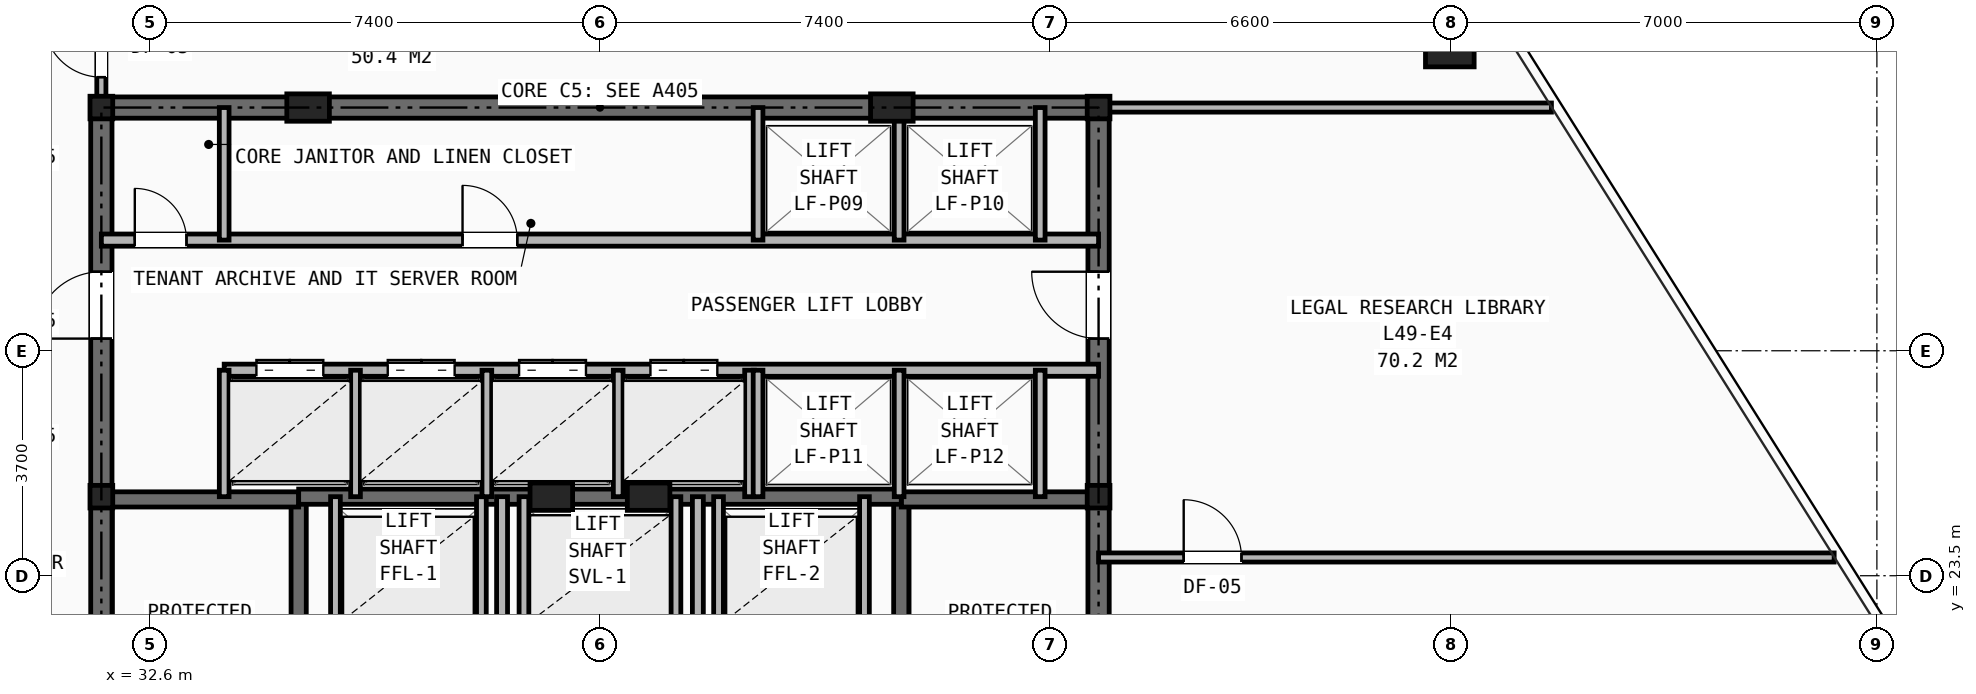
"""IFC4 building model, lengths in metres.
Left out: names, types, materials, properties, quantities, classifications, styles, units other than length and angle.
Written with IfcOpenShell. Run it as: python <this file> out.ifc"""

import sys

from ifc_helpers import new_model, si_unit, direction, frame, frame_2d, origin, origin_2d, place, context, subcontext, project, spatial, rectangle, hollow_rectangle, i_section, extrude, element, fill, save


model = new_model("IFC4")
c1 = context("Model", 3, precision=1e-05, world=origin(), true_north=direction((0.0, 1.0)))
c2 = subcontext(c1, "Body", "Model", "MODEL_VIEW")
j1 = project(units=[si_unit("LENGTHUNIT", "METRE"), si_unit("PLANEANGLEUNIT", "RADIAN")], contexts=[c1])
p1 = place(None, origin())
s1 = spatial("IfcSite", under=j1, at=p1, CompositionType="ELEMENT")
p2 = place(p1, origin())
s2 = spatial("IfcBuilding", under=s1, at=p2, CompositionType="ELEMENT")
p3 = place(p2, frame((0.0, 0.0, 172.35)))
s3 = spatial("IfcBuildingStorey", under=s2, at=p3, CompositionType="ELEMENT", Elevation=172.35)
for number, where, z_axis, x_axis in (
    (1, (31.8, 24.8, 0.0), (0.0, 0.0, 1.0), (1.0, 0.0, 0.0)),
    (2, (48.2, 24.8, 0.0), (0.0, 0.0, 1.0), (1.0, 0.0, 0.0)),
    (3, (31.8, 31.2, 0.0), (0.0, 0.0, 1.0), (1.0, 0.0, 0.0)),
    (4, (48.2, 31.2, 0.0), (0.0, 0.0, 1.0), (1.0, 0.0, 0.0)),
):
    element("IfcColumn", number, at=place(p3, frame(where, z_axis=z_axis, x_axis=x_axis)), inside=s3, PredefinedType="COLUMN", context=c2, shape_type="SweptSolid", body=[
        extrude(i_section(OverallWidth=0.374, OverallDepth=0.372, WebThickness=0.016, FlangeThickness=0.026, at=origin_2d()), origin(), (0.0, 0.0, 1.0), 3.45),
    ])
for number, where, z_axis, x_axis in (
    (5, (35.2, 31.2, 0.0), (0.0, 0.0, 1.0), (1.0, 0.0, 0.0)),
    (6, (44.8, 31.2, 0.0), (0.0, 0.0, 1.0), (1.0, 0.0, 0.0)),
    (7, (39.2, 24.8, 0.0), (0.0, 0.0, 1.0), (1.0, 0.0, 0.0)),
    (8, (40.8, 24.8, 0.0), (0.0, 0.0, 1.0), (1.0, 0.0, 0.0)),
):
    element("IfcColumn", number, at=place(p3, frame(where, z_axis=z_axis, x_axis=x_axis)), inside=s3, PredefinedType="PILASTER", context=c2, shape_type="SweptSolid", body=[
        extrude(rectangle(XDim=0.7, YDim=0.45, at=origin_2d()), origin(), (0.0, 0.0, 1.0), 3.45),
    ])
p4 = place(p3, frame((53.976, 32.269, 0.0), z_axis=(0.0, 0.0, 1.0), x_axis=(1.0, 0.0, 0.0)))
e9 = element("IfcColumn", 9, at=p4, inside=s3, PredefinedType="COLUMN", context=c2, shape_type="SweptSolid", body=[
    extrude(hollow_rectangle(XDim=0.8, YDim=0.8, WallThickness=0.055, at=origin_2d()), origin(), (0.0, 0.0, 1.0), 3.45),
])
p5 = place(p3, frame((31.8, 31.2, 0.0), z_axis=(0.0, 0.0, 1.0), x_axis=(1.0, 0.0, 0.0)))
e10 = element("IfcWall", 10, at=p5, inside=s3, PredefinedType="SHEAR", context=c2, shape_type="SweptSolid", body=[
    extrude(rectangle(XDim=16.4, YDim=0.35, at=frame_2d((8.2, 0.0))), origin(), (0.0, 0.0, 1.0), 3.21),
])
p6 = place(p3, frame((31.8, 16.4, 0.0), z_axis=(0.0, 0.0, 1.0), x_axis=(0.0, 1.0, 0.0)))
e11 = element("IfcWall", 11, at=p6, inside=s3, PredefinedType="SHEAR", context=c2, shape_type="SweptSolid", body=[
    extrude(rectangle(XDim=14.8, YDim=0.35, at=frame_2d((7.4, 0.0))), origin(), (0.0, 0.0, 1.0), 3.21),
])
p7 = place(p6, frame((11.0, 0.0, 0.0)))
e12 = element("IfcOpeningElement", 12, at=p7, cuts=e11, PredefinedType="OPENING", context=c2, shape_type="SweptSolid", body=[
    extrude(rectangle(XDim=1.1, YDim=2.15, at=frame_2d((0.55, 1.075))), frame((0.0, 0.185, 0.0), z_axis=(0.0, -1.0, 0.0), x_axis=(1.0, 0.0, 0.0)), (0.0, 0.0, 1.0), 0.37),
])
p8 = place(p3, frame((48.2, 16.4, 0.0), z_axis=(0.0, 0.0, 1.0), x_axis=(0.0, 1.0, 0.0)))
e13 = element("IfcWall", 13, at=p8, inside=s3, PredefinedType="SHEAR", context=c2, shape_type="SweptSolid", body=[
    extrude(rectangle(XDim=14.8, YDim=0.35, at=frame_2d((7.4, 0.0))), origin(), (0.0, 0.0, 1.0), 3.21),
])
p9 = place(p8, frame((11.0, 0.0, 0.0)))
e14 = element("IfcOpeningElement", 14, at=p9, cuts=e13, PredefinedType="OPENING", context=c2, shape_type="SweptSolid", body=[
    extrude(rectangle(XDim=1.1, YDim=2.15, at=frame_2d((0.55, 1.075))), frame((0.0, 0.185, 0.0), z_axis=(0.0, -1.0, 0.0), x_axis=(1.0, 0.0, 0.0)), (0.0, 0.0, 1.0), 0.37),
])
p10 = place(p3, frame((35.045, 16.4, 0.0), z_axis=(0.0, 0.0, 1.0), x_axis=(0.0, 1.0, 0.0)))
e15 = element("IfcWall", 15, at=p10, inside=s3, PredefinedType="SHEAR", context=c2, shape_type="SweptSolid", body=[
    extrude(rectangle(XDim=8.4, YDim=0.25, at=frame_2d((4.2, 0.0))), origin(), (0.0, 0.0, 1.0), 3.21),
])
p11 = place(p10, frame((0.45, 0.0, 0.0)))
e16 = element("IfcOpeningElement", 16, at=p11, cuts=e15, PredefinedType="OPENING", context=c2, shape_type="SweptSolid", body=[
    extrude(rectangle(XDim=0.95, YDim=2.1, at=frame_2d((0.475, 1.05))), frame((0.0, 0.135, 0.0), z_axis=(0.0, -1.0, 0.0), x_axis=(1.0, 0.0, 0.0)), (0.0, 0.0, 1.0), 0.27),
])
p12 = place(p3, frame((31.8, 24.755, 0.0), z_axis=(0.0, 0.0, 1.0), x_axis=(1.0, 0.0, 0.0)))
e17 = element("IfcWall", 17, at=p12, inside=s3, PredefinedType="SHEAR", context=c2, shape_type="SweptSolid", body=[
    extrude(rectangle(XDim=3.245, YDim=0.25, at=frame_2d((1.623, 0.0))), origin(), (0.0, 0.0, 1.0), 3.21),
])
p13 = place(p3, frame((44.955, 16.4, 0.0), z_axis=(0.0, 0.0, 1.0), x_axis=(0.0, 1.0, 0.0)))
e18 = element("IfcWall", 18, at=p13, inside=s3, PredefinedType="SHEAR", context=c2, shape_type="SweptSolid", body=[
    extrude(rectangle(XDim=8.4, YDim=0.25, at=frame_2d((4.2, 0.0))), origin(), (0.0, 0.0, 1.0), 3.21),
])
p14 = place(p13, frame((0.45, 0.0, 0.0)))
e19 = element("IfcOpeningElement", 19, at=p14, cuts=e18, PredefinedType="OPENING", context=c2, shape_type="SweptSolid", body=[
    extrude(rectangle(XDim=0.95, YDim=2.1, at=frame_2d((0.475, 1.05))), frame((0.0, 0.135, 0.0), z_axis=(0.0, -1.0, 0.0), x_axis=(1.0, 0.0, 0.0)), (0.0, 0.0, 1.0), 0.27),
])
p15 = place(p3, frame((44.955, 24.755, 0.0), z_axis=(0.0, 0.0, 1.0), x_axis=(1.0, 0.0, 0.0)))
e20 = element("IfcWall", 20, at=p15, inside=s3, PredefinedType="SHEAR", context=c2, shape_type="SweptSolid", body=[
    extrude(rectangle(XDim=3.245, YDim=0.25, at=frame_2d((1.623, 0.0))), origin(), (0.0, 0.0, 1.0), 3.21),
])
p16 = place(p3, frame((35.045, 24.8, 0.0), z_axis=(0.0, 0.0, 1.0), x_axis=(1.0, 0.0, 0.0)))
e21 = element("IfcWall", 21, at=p16, inside=s3, PredefinedType="SHEAR", context=c2, shape_type="SweptSolid", body=[
    extrude(rectangle(XDim=9.91, YDim=0.25, at=frame_2d((4.955, 0.0))), origin(), (0.0, 0.0, 1.0), 3.21),
])
p17 = place(p3, frame((38.39, 16.4, 0.0), z_axis=(0.0, 0.0, 1.0), x_axis=(0.0, 1.0, 0.0)))
e22 = element("IfcWall", 22, at=p17, inside=s3, PredefinedType="PARTITIONING", context=c2, shape_type="SweptSolid", body=[
    extrude(rectangle(XDim=8.4, YDim=0.18, at=frame_2d((4.2, 0.0))), origin(), (0.0, 0.0, 1.0), 2.665),
])
p18 = place(p17, frame((3.8, 0.0, 0.0)))
e23 = element("IfcOpeningElement", 23, at=p18, cuts=e22, PredefinedType="OPENING", context=c2, shape_type="SweptSolid", body=[
    extrude(rectangle(XDim=0.95, YDim=2.1, at=frame_2d((0.475, 1.05))), frame((0.0, 0.1, 0.0), z_axis=(0.0, -1.0, 0.0), x_axis=(1.0, 0.0, 0.0)), (0.0, 0.0, 1.0), 0.2),
])
p19 = place(p3, frame((41.61, 16.4, 0.0), z_axis=(0.0, 0.0, 1.0), x_axis=(0.0, 1.0, 0.0)))
e24 = element("IfcWall", 24, at=p19, inside=s3, PredefinedType="PARTITIONING", context=c2, shape_type="SweptSolid", body=[
    extrude(rectangle(XDim=8.4, YDim=0.18, at=frame_2d((4.2, 0.0))), origin(), (0.0, 0.0, 1.0), 2.665),
])
for number, where, z_axis, x_axis in (
    (25, (35.65, 22.48, 0.0), (0.0, 0.0, 1.0), (0.0, 1.0, 0.0)),
    (26, (38.05, 22.48, 0.0), (0.0, 0.0, 1.0), (0.0, 1.0, 0.0)),
    (27, (41.95, 22.48, 0.0), (0.0, 0.0, 1.0), (0.0, 1.0, 0.0)),
    (28, (44.35, 22.48, 0.0), (0.0, 0.0, 1.0), (0.0, 1.0, 0.0)),
    (29, (38.75, 22.48, 0.0), (0.0, 0.0, 1.0), (0.0, 1.0, 0.0)),
    (30, (41.25, 22.48, 0.0), (0.0, 0.0, 1.0), (0.0, 1.0, 0.0)),
):
    element("IfcWall", number, at=place(p3, frame(where, z_axis=z_axis, x_axis=x_axis)), inside=s3, PredefinedType="SOLIDWALL", context=c2, shape_type="SweptSolid", body=[
        extrude(rectangle(XDim=2.32, YDim=0.16, at=frame_2d((1.16, 0.0))), origin(), (0.0, 0.0, 1.0), 3.21),
    ])
p20 = place(p3, frame((31.8, 29.02, 0.0), z_axis=(0.0, 0.0, 1.0), x_axis=(1.0, 0.0, 0.0)))
e31 = element("IfcWall", 31, at=p20, inside=s3, PredefinedType="SOLIDWALL", context=c2, shape_type="SweptSolid", body=[
    extrude(rectangle(XDim=16.4, YDim=0.2, at=frame_2d((8.2, 0.0))), origin(), (0.0, 0.0, 1.0), 2.665),
])
p21 = place(p20, frame((0.55, 0.0, 0.0)))
e32 = element("IfcOpeningElement", 32, at=p21, cuts=e31, PredefinedType="OPENING", context=c2, shape_type="SweptSolid", body=[
    extrude(rectangle(XDim=0.85, YDim=2.05, at=frame_2d((0.425, 1.025))), frame((0.0, 0.11, 0.0), z_axis=(0.0, -1.0, 0.0), x_axis=(1.0, 0.0, 0.0)), (0.0, 0.0, 1.0), 0.22),
])
p22 = place(p20, frame((5.94, 0.0, 0.0)))
e33 = element("IfcOpeningElement", 33, at=p22, cuts=e31, PredefinedType="OPENING", context=c2, shape_type="SweptSolid", body=[
    extrude(rectangle(XDim=0.9, YDim=2.1, at=frame_2d((0.45, 1.05))), frame((0.0, 0.11, 0.0), z_axis=(0.0, -1.0, 0.0), x_axis=(1.0, 0.0, 0.0)), (0.0, 0.0, 1.0), 0.22),
])
p23 = place(p3, frame((33.82, 26.88, 0.0), z_axis=(0.0, 0.0, 1.0), x_axis=(1.0, 0.0, 0.0)))
e34 = element("IfcWall", 34, at=p23, inside=s3, PredefinedType="SOLIDWALL", context=c2, shape_type="SweptSolid", body=[
    extrude(rectangle(XDim=14.38, YDim=0.2, at=frame_2d((7.19, 0.0))), origin(), (0.0, 0.0, 1.0), 2.665),
])
p24 = place(p23, frame((0.53, 0.0, 0.0)))
e35 = element("IfcOpeningElement", 35, at=p24, cuts=e34, PredefinedType="OPENING", context=c2, shape_type="SweptSolid", body=[
    extrude(rectangle(XDim=1.1, YDim=2.15, at=frame_2d((0.55, 1.075))), frame((0.0, 0.11, 0.0), z_axis=(0.0, -1.0, 0.0), x_axis=(1.0, 0.0, 0.0)), (0.0, 0.0, 1.0), 0.22),
])
p25 = place(p23, frame((2.69, 0.0, 0.0)))
e36 = element("IfcOpeningElement", 36, at=p25, cuts=e34, PredefinedType="OPENING", context=c2, shape_type="SweptSolid", body=[
    extrude(rectangle(XDim=1.1, YDim=2.15, at=frame_2d((0.55, 1.075))), frame((0.0, 0.11, 0.0), z_axis=(0.0, -1.0, 0.0), x_axis=(1.0, 0.0, 0.0)), (0.0, 0.0, 1.0), 0.22),
])
p26 = place(p23, frame((4.85, 0.0, 0.0)))
e37 = element("IfcOpeningElement", 37, at=p26, cuts=e34, PredefinedType="OPENING", context=c2, shape_type="SweptSolid", body=[
    extrude(rectangle(XDim=1.1, YDim=2.15, at=frame_2d((0.55, 1.075))), frame((0.0, 0.11, 0.0), z_axis=(0.0, -1.0, 0.0), x_axis=(1.0, 0.0, 0.0)), (0.0, 0.0, 1.0), 0.22),
])
p27 = place(p23, frame((7.01, 0.0, 0.0)))
e38 = element("IfcOpeningElement", 38, at=p27, cuts=e34, PredefinedType="OPENING", context=c2, shape_type="SweptSolid", body=[
    extrude(rectangle(XDim=1.1, YDim=2.15, at=frame_2d((0.55, 1.075))), frame((0.0, 0.11, 0.0), z_axis=(0.0, -1.0, 0.0), x_axis=(1.0, 0.0, 0.0)), (0.0, 0.0, 1.0), 0.22),
])
p28 = place(p3, frame((33.82, 29.02, 0.0), z_axis=(0.0, 0.0, 1.0), x_axis=(0.0, 1.0, 0.0)))
e39 = element("IfcWall", 39, at=p28, inside=s3, PredefinedType="SOLIDWALL", context=c2, shape_type="SweptSolid", body=[
    extrude(rectangle(XDim=2.18, YDim=0.16, at=frame_2d((1.09, 0.0))), origin(), (0.0, 0.0, 1.0), 2.665),
])
for number, where, z_axis, x_axis in (
    (40, (33.82, 24.8, 0.0), (0.0, 0.0, 1.0), (0.0, 1.0, 0.0)),
    (41, (35.98, 24.8, 0.0), (0.0, 0.0, 1.0), (0.0, 1.0, 0.0)),
    (42, (38.14, 24.8, 0.0), (0.0, 0.0, 1.0), (0.0, 1.0, 0.0)),
    (43, (40.3, 24.8, 0.0), (0.0, 0.0, 1.0), (0.0, 1.0, 0.0)),
    (44, (42.46, 24.8, 0.0), (0.0, 0.0, 1.0), (0.0, 1.0, 0.0)),
):
    element("IfcWall", number, at=place(p3, frame(where, z_axis=z_axis, x_axis=x_axis)), inside=s3, PredefinedType="SOLIDWALL", context=c2, shape_type="SweptSolid", body=[
        extrude(rectangle(XDim=2.08, YDim=0.16, at=frame_2d((1.04, 0.0))), origin(), (0.0, 0.0, 1.0), 3.21),
    ])
for number, where, z_axis, x_axis in (
    (45, (42.6, 29.02, 0.0), (0.0, 0.0, 1.0), (0.0, 1.0, 0.0)),
    (46, (44.92, 29.02, 0.0), (0.0, 0.0, 1.0), (0.0, 1.0, 0.0)),
    (47, (47.24, 29.02, 0.0), (0.0, 0.0, 1.0), (0.0, 1.0, 0.0)),
):
    element("IfcWall", number, at=place(p3, frame(where, z_axis=z_axis, x_axis=x_axis)), inside=s3, PredefinedType="SOLIDWALL", context=c2, shape_type="SweptSolid", body=[
        extrude(rectangle(XDim=2.18, YDim=0.16, at=frame_2d((1.09, 0.0))), origin(), (0.0, 0.0, 1.0), 2.665),
    ])
for number, where, z_axis, x_axis in (
    (48, (42.6, 24.8, 0.0), (0.0, 0.0, 1.0), (0.0, 1.0, 0.0)),
    (49, (44.92, 24.8, 0.0), (0.0, 0.0, 1.0), (0.0, 1.0, 0.0)),
    (50, (47.24, 24.8, 0.0), (0.0, 0.0, 1.0), (0.0, 1.0, 0.0)),
):
    element("IfcWall", number, at=place(p3, frame(where, z_axis=z_axis, x_axis=x_axis)), inside=s3, PredefinedType="SOLIDWALL", context=c2, shape_type="SweptSolid", body=[
        extrude(rectangle(XDim=2.08, YDim=0.16, at=frame_2d((1.04, 0.0))), origin(), (0.0, 0.0, 1.0), 3.21),
    ])
p29 = place(p3, frame((31.8, 31.2, 0.0), z_axis=(0.0, 0.0, 1.0), x_axis=(0.0, 1.0, 0.0)))
e51 = element("IfcWall", 51, at=p29, inside=s3, PredefinedType="PARTITIONING", context=c2, shape_type="SweptSolid", body=[
    extrude(rectangle(XDim=5.3, YDim=0.15, at=frame_2d((2.65, 0.0))), origin(), (0.0, 0.0, 1.0), 2.252),
])
p30 = place(p29, frame((0.5, 0.0, 0.0)))
e52 = element("IfcOpeningElement", 52, at=p30, cuts=e51, PredefinedType="OPENING", context=c2, shape_type="SweptSolid", body=[
    extrude(rectangle(XDim=0.95, YDim=2.1, at=frame_2d((0.475, 1.05))), frame((0.0, 0.085, 0.0), z_axis=(0.0, -1.0, 0.0), x_axis=(1.0, 0.0, 0.0)), (0.0, 0.0, 1.0), 0.17),
])
p31 = place(p29, frame((2.9, 0.0, 0.0)))
e53 = element("IfcOpeningElement", 53, at=p31, cuts=e51, PredefinedType="OPENING", context=c2, shape_type="SweptSolid", body=[
    extrude(rectangle(XDim=0.95, YDim=2.1, at=frame_2d((0.475, 1.05))), frame((0.0, 0.085, 0.0), z_axis=(0.0, -1.0, 0.0), x_axis=(1.0, 0.0, 0.0)), (0.0, 0.0, 1.0), 0.17),
])
p32 = place(p3, frame((48.2, 31.2, 0.0), z_axis=(0.0, 0.0, 1.0), x_axis=(1.0, 0.0, 0.0)))
e54 = element("IfcWall", 54, at=p32, inside=s3, PredefinedType="PARTITIONING", context=c2, shape_type="SweptSolid", body=[
    extrude(rectangle(XDim=7.448, YDim=0.15, at=frame_2d((3.724, 0.0))), origin(), (0.0, 0.0, 1.0), 2.252),
])
p33 = place(p3, frame((48.2, 23.8, 0.0), z_axis=(0.0, 0.0, 1.0), x_axis=(1.0, 0.0, 0.0)))
e55 = element("IfcWall", 55, at=p33, inside=s3, PredefinedType="PARTITIONING", context=c2, shape_type="SweptSolid", body=[
    extrude(rectangle(XDim=12.097, YDim=0.15, at=frame_2d((6.049, 0.0))), origin(), (0.0, 0.0, 1.0), 2.589),
])
p34 = place(p33, frame((1.4, 0.0, 0.0)))
e56 = element("IfcOpeningElement", 56, at=p34, cuts=e55, PredefinedType="OPENING", context=c2, shape_type="SweptSolid", body=[
    extrude(rectangle(XDim=0.95, YDim=2.1, at=frame_2d((0.475, 1.05))), frame((0.0, 0.085, 0.0), z_axis=(0.0, -1.0, 0.0), x_axis=(1.0, 0.0, 0.0)), (0.0, 0.0, 1.0), 0.17),
])
p35 = place(p21, origin())
e57 = element("IfcDoor", 57, at=p35, inside=s3, OperationType="SINGLE_SWING_LEFT", PredefinedType="DOOR", context=c2, shape_type="SweptSolid", body=[
    extrude(rectangle(XDim=0.85, YDim=2.05, at=frame_2d((0.425, 1.025))), frame((0.0, 0.025, 0.0), z_axis=(0.0, -1.0, 0.0), x_axis=(1.0, 0.0, 0.0)), (0.0, 0.0, 1.0), 0.05),
])
fill(e32, e57)
p36 = place(p7, origin())
e58 = element("IfcDoor", 58, at=p36, inside=s3, OperationType="SINGLE_SWING_LEFT", PredefinedType="DOOR", context=c2, shape_type="SweptSolid", body=[
    extrude(rectangle(XDim=1.1, YDim=2.15, at=frame_2d((0.55, 1.075))), frame((0.0, 0.025, 0.0), z_axis=(0.0, -1.0, 0.0), x_axis=(1.0, 0.0, 0.0)), (0.0, 0.0, 1.0), 0.05),
])
fill(e12, e58)
p37 = place(p9, origin())
e59 = element("IfcDoor", 59, at=p37, inside=s3, OperationType="SINGLE_SWING_RIGHT", PredefinedType="DOOR", context=c2, shape_type="SweptSolid", body=[
    extrude(rectangle(XDim=1.1, YDim=2.15, at=frame_2d((0.55, 1.075))), frame((0.0, 0.025, 0.0), z_axis=(0.0, -1.0, 0.0), x_axis=(1.0, 0.0, 0.0)), (0.0, 0.0, 1.0), 0.05),
])
fill(e14, e59)
p38 = place(p22, origin())
e60 = element("IfcDoor", 60, at=p38, inside=s3, OperationType="SINGLE_SWING_LEFT", PredefinedType="DOOR", context=c2, shape_type="SweptSolid", body=[
    extrude(rectangle(XDim=0.9, YDim=2.1, at=frame_2d((0.45, 1.05))), frame((0.0, 0.025, 0.0), z_axis=(0.0, -1.0, 0.0), x_axis=(1.0, 0.0, 0.0)), (0.0, 0.0, 1.0), 0.05),
])
fill(e33, e60)
p39 = place(p24, origin())
e61 = element("IfcDoor", 61, at=p39, inside=s3, OperationType="DOUBLE_DOOR_SLIDING", PredefinedType="DOOR", context=c2, shape_type="SweptSolid", body=[
    extrude(rectangle(XDim=1.1, YDim=2.15, at=frame_2d((0.55, 1.075))), frame((0.0, 0.025, 0.0), z_axis=(0.0, -1.0, 0.0), x_axis=(1.0, 0.0, 0.0)), (0.0, 0.0, 1.0), 0.05),
])
fill(e35, e61)
p40 = place(p25, origin())
e62 = element("IfcDoor", 62, at=p40, inside=s3, OperationType="DOUBLE_DOOR_SLIDING", PredefinedType="DOOR", context=c2, shape_type="SweptSolid", body=[
    extrude(rectangle(XDim=1.1, YDim=2.15, at=frame_2d((0.55, 1.075))), frame((0.0, 0.025, 0.0), z_axis=(0.0, -1.0, 0.0), x_axis=(1.0, 0.0, 0.0)), (0.0, 0.0, 1.0), 0.05),
])
fill(e36, e62)
p41 = place(p26, origin())
e63 = element("IfcDoor", 63, at=p41, inside=s3, OperationType="DOUBLE_DOOR_SLIDING", PredefinedType="DOOR", context=c2, shape_type="SweptSolid", body=[
    extrude(rectangle(XDim=1.1, YDim=2.15, at=frame_2d((0.55, 1.075))), frame((0.0, 0.025, 0.0), z_axis=(0.0, -1.0, 0.0), x_axis=(1.0, 0.0, 0.0)), (0.0, 0.0, 1.0), 0.05),
])
fill(e37, e63)
p42 = place(p27, origin())
e64 = element("IfcDoor", 64, at=p42, inside=s3, OperationType="DOUBLE_DOOR_SLIDING", PredefinedType="DOOR", context=c2, shape_type="SweptSolid", body=[
    extrude(rectangle(XDim=1.1, YDim=2.15, at=frame_2d((0.55, 1.075))), frame((0.0, 0.025, 0.0), z_axis=(0.0, -1.0, 0.0), x_axis=(1.0, 0.0, 0.0)), (0.0, 0.0, 1.0), 0.05),
])
fill(e38, e64)
p43 = place(p30, origin())
e65 = element("IfcDoor", 65, at=p43, inside=s3, OperationType="SINGLE_SWING_RIGHT", PredefinedType="DOOR", context=c2, shape_type="SweptSolid", body=[
    extrude(rectangle(XDim=0.95, YDim=2.1, at=frame_2d((0.475, 1.05))), frame((0.0, 0.025, 0.0), z_axis=(0.0, -1.0, 0.0), x_axis=(1.0, 0.0, 0.0)), (0.0, 0.0, 1.0), 0.05),
])
fill(e52, e65)
p44 = place(p34, origin())
e66 = element("IfcDoor", 66, at=p44, inside=s3, OperationType="SINGLE_SWING_LEFT", PredefinedType="DOOR", context=c2, shape_type="SweptSolid", body=[
    extrude(rectangle(XDim=0.95, YDim=2.1, at=frame_2d((0.475, 1.05))), frame((0.0, 0.025, 0.0), z_axis=(0.0, -1.0, 0.0), x_axis=(1.0, 0.0, 0.0)), (0.0, 0.0, 1.0), 0.05),
])
fill(e56, e66)
save(model, sys.argv[1])
